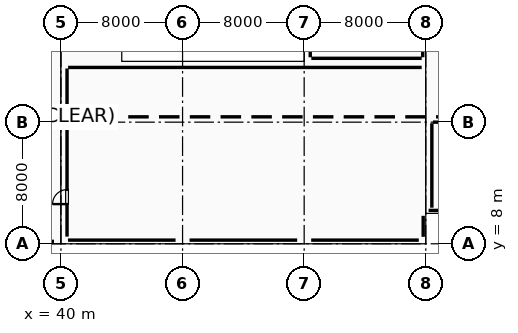
"""IFC4 building model, lengths in metres.
Left out: names, types, materials, properties, quantities, classifications, styles, units other than length and angle.
Written with IfcOpenShell. Run it as: python <this file> out.ifc"""

import sys

from ifc_helpers import new_model, si_unit, direction, frame, frame_2d, origin, origin_2d, place, context, subcontext, project, spatial, rectangle, circle, extrude, element, fill, save


model = new_model("IFC4")
c1 = context("Model", 3, precision=1e-05, world=origin(), true_north=direction((0.0, 1.0)))
c2 = subcontext(c1, "Body", "Model", "MODEL_VIEW")
j1 = project(units=[si_unit("LENGTHUNIT", "METRE"), si_unit("PLANEANGLEUNIT", "RADIAN")], contexts=[c1])
p1 = place(None, origin())
s1 = spatial("IfcSite", under=j1, at=p1, CompositionType="ELEMENT")
p2 = place(p1, origin())
s2 = spatial("IfcBuilding", under=s1, at=p2, CompositionType="ELEMENT")
p3 = place(p2, frame((0.0, 0.0, 10.2)))
s3 = spatial("IfcBuildingStorey", under=s2, at=p3, CompositionType="ELEMENT", Elevation=10.2)
for number, where, z_axis, x_axis in (
    (1, (40.0, 8.0, 0.0), (0.0, 0.0, 1.0), (1.0, 0.0, 0.0)),
    (2, (40.0, 16.0, 0.0), (0.0, 0.0, 1.0), (1.0, 0.0, 0.0)),
):
    element("IfcColumn", number, at=place(p3, frame(where, z_axis=z_axis, x_axis=x_axis)), inside=s3, PredefinedType="COLUMN", context=c2, shape_type="SweptSolid", body=[
        extrude(rectangle(XDim=0.9, YDim=0.9, at=origin_2d()), origin(), (0.0, 0.0, 1.0), 4.8),
    ])
p4 = place(p3, frame((48.0, 8.0, 0.0), z_axis=(0.0, 0.0, 1.0), x_axis=(1.0, 0.0, 0.0)))
e3 = element("IfcColumn", 3, at=p4, inside=s3, PredefinedType="COLUMN", context=c2, shape_type="SweptSolid", body=[
    extrude(circle(Radius=0.45, at=origin_2d()), origin(), (0.0, 0.0, 1.0), 4.76),
])
p5 = place(p3, frame((48.0, 16.0, 0.0), z_axis=(0.0, 0.0, 1.0), x_axis=(1.0, 0.0, 0.0)))
e4 = element("IfcColumn", 4, at=p5, inside=s3, PredefinedType="COLUMN", context=c2, shape_type="SweptSolid", body=[
    extrude(rectangle(XDim=0.75, YDim=0.75, at=origin_2d()), origin(), (0.0, 0.0, 1.0), 4.8),
])
p6 = place(p3, frame((56.0, 8.0, 0.0), z_axis=(0.0, 0.0, 1.0), x_axis=(1.0, 0.0, 0.0)))
e5 = element("IfcColumn", 5, at=p6, inside=s3, PredefinedType="COLUMN", context=c2, shape_type="SweptSolid", body=[
    extrude(circle(Radius=0.45, at=origin_2d()), origin(), (0.0, 0.0, 1.0), 4.76),
])
p7 = place(p3, frame((56.0, 16.0, 0.0), z_axis=(0.0, 0.0, 1.0), x_axis=(1.0, 0.0, 0.0)))
e6 = element("IfcColumn", 6, at=p7, inside=s3, PredefinedType="COLUMN", context=c2, shape_type="SweptSolid", body=[
    extrude(rectangle(XDim=0.75, YDim=0.75, at=origin_2d()), origin(), (0.0, 0.0, 1.0), 4.8),
])
p8 = place(p3, frame((64.0, 8.0, 0.0), z_axis=(0.0, 0.0, 1.0), x_axis=(1.0, 0.0, 0.0)))
e7 = element("IfcColumn", 7, at=p8, inside=s3, PredefinedType="COLUMN", context=c2, shape_type="SweptSolid", body=[
    extrude(rectangle(XDim=0.9, YDim=0.9, at=origin_2d()), origin(), (0.0, 0.0, 1.0), 4.8),
])
p9 = place(p3, frame((118.415, 10.195, 0.0), z_axis=(0.0, 0.0, 1.0), x_axis=(-1.0, 0.0, 0.0)))
e8 = element("IfcWall", 8, at=p9, inside=s3, PredefinedType="STANDARD", context=c2, shape_type="SweptSolid", body=[
    extrude(rectangle(XDim=54.23, YDim=0.35, at=frame_2d((27.115, 0.0))), origin(), (0.0, 0.0, 1.0), 3.725),
])
p10 = place(p3, frame((63.83, 9.84, 0.0), z_axis=(0.0, 0.0, 1.0), x_axis=(0.0, -1.0, 0.0)))
e9 = element("IfcWall", 9, at=p10, inside=s3, PredefinedType="STANDARD", context=c2, shape_type="SweptSolid", body=[
    extrude(rectangle(XDim=1.382, YDim=0.3, at=frame_2d((0.691, 0.0))), origin(), (0.0, 0.0, 1.0), 4.58),
])
for number, where, z_axis, x_axis in (
    (10, (63.54, 8.24, 0.0), (0.0, 0.0, 1.0), (-1.0, 0.0, 0.0)),
    (11, (55.54, 8.24, 0.0), (0.0, 0.0, 1.0), (-1.0, 0.0, 0.0)),
    (12, (47.54, 8.24, 0.0), (0.0, 0.0, 1.0), (-1.0, 0.0, 0.0)),
):
    element("IfcWall", number, at=place(p3, frame(where, z_axis=z_axis, x_axis=x_axis)), inside=s3, PredefinedType="PARAPET", context=c2, shape_type="SweptSolid", body=[
        extrude(rectangle(XDim=7.08, YDim=0.18, at=frame_2d((3.54, 0.0))), origin(), (0.0, 0.0, 1.0), 0.88),
    ])
p11 = place(p3, frame((39.542, 8.16, 0.0), z_axis=(0.0, 0.0, 1.0), x_axis=(-1.0, 0.0, 0.0)))
e13 = element("IfcWall", 13, at=p11, inside=s3, PredefinedType="STANDARD", context=c2, shape_type="SweptSolid", body=[
    extrude(rectangle(XDim=7.184, YDim=0.28, at=frame_2d((3.592, 0.0))), origin(), (0.0, 0.0, 1.0), 4.125),
])
p12 = place(p11, frame((2.392, 0.0, 0.95)))
e14 = element("IfcOpeningElement", 14, at=p12, cuts=e13, PredefinedType="OPENING", context=c2, shape_type="SweptSolid", body=[
    extrude(rectangle(XDim=2.4, YDim=1.2, at=frame_2d((1.2, 0.6))), frame((0.0, 0.15, 0.0), z_axis=(0.0, -1.0, 0.0), x_axis=(1.0, 0.0, 0.0)), (0.0, 0.0, 1.0), 0.3),
])
p13 = place(p3, frame((64.47, 16.0, 0.0), z_axis=(0.0, 0.0, 1.0), x_axis=(1.0, 0.0, 0.0)))
e15 = element("IfcWall", 15, at=p13, inside=s3, PredefinedType="PARTITIONING", context=c2, shape_type="SweptSolid", body=[
    extrude(rectangle(XDim=4.915, YDim=0.1, at=frame_2d((2.458, 0.0))), origin(), (0.0, 0.0, 1.0), 3.92),
])
p14 = place(p13, frame((1.933, 0.0, 0.0)))
e16 = element("IfcOpeningElement", 16, at=p14, cuts=e15, PredefinedType="OPENING", context=c2, shape_type="SweptSolid", body=[
    extrude(rectangle(XDim=1.05, YDim=2.15, at=frame_2d((0.525, 1.075))), frame((0.0, 0.06, 0.0), z_axis=(0.0, -1.0, 0.0), x_axis=(1.0, 0.0, 0.0)), (0.0, 0.0, 1.0), 0.12),
])
p15 = place(p3, frame((64.4, 10.374, 0.0), z_axis=(0.0, 0.0, 1.0), x_axis=(0.0, 1.0, 0.0)))
e17 = element("IfcWall", 17, at=p15, inside=s3, PredefinedType="PARTITIONING", context=c2, shape_type="SweptSolid", body=[
    extrude(rectangle(XDim=5.556, YDim=0.1, at=frame_2d((2.778, 0.0))), origin(), (0.0, 0.0, 1.0), 3.72),
])
p16 = place(p3, frame((40.47, 19.6, 0.0), z_axis=(0.0, 0.0, 1.0), x_axis=(1.0, 0.0, 0.0)))
e18 = element("IfcWall", 18, at=p16, inside=s3, PredefinedType="PARTITIONING", context=c2, shape_type="SweptSolid", body=[
    extrude(rectangle(XDim=23.26, YDim=0.1, at=frame_2d((11.63, 0.0))), origin(), (0.0, 0.0, 1.0), 4.53),
])
p17 = place(p3, frame((40.4, 8.47, 0.0), z_axis=(0.0, 0.0, 1.0), x_axis=(0.0, 1.0, 0.0)))
e19 = element("IfcWall", 19, at=p17, inside=s3, PredefinedType="PARTITIONING", context=c2, shape_type="SweptSolid", body=[
    extrude(rectangle(XDim=7.065, YDim=0.1, at=frame_2d((3.532, 0.0))), origin(), (0.0, 0.0, 1.0), 4.57),
])
p18 = place(p17, frame((2.14, 0.0, 0.0)))
e20 = element("IfcOpeningElement", 20, at=p18, cuts=e19, PredefinedType="OPENING", context=c2, shape_type="SweptSolid", body=[
    extrude(rectangle(XDim=0.95, YDim=2.15, at=frame_2d((0.475, 1.075))), frame((0.0, 0.06, 0.0), z_axis=(0.0, -1.0, 0.0), x_axis=(1.0, 0.0, 0.0)), (0.0, 0.0, 1.0), 0.12),
])
p19 = place(p3, frame((40.4, 16.465, 0.0), z_axis=(0.0, 0.0, 1.0), x_axis=(0.0, 1.0, 0.0)))
e21 = element("IfcWall", 21, at=p19, inside=s3, PredefinedType="PARTITIONING", context=c2, shape_type="SweptSolid", body=[
    extrude(rectangle(XDim=3.065, YDim=0.1, at=frame_2d((1.532, 0.0))), origin(), (0.0, 0.0, 1.0), 4.53),
])
p20 = place(p3, frame((63.8, 40.13, 0.0), z_axis=(0.0, 0.0, 1.0), x_axis=(0.0, -1.0, 0.0)))
e22 = element("IfcWall", 22, at=p20, inside=s3, PredefinedType="PARTITIONING", context=c2, shape_type="SweptSolid", body=[
    extrude(rectangle(XDim=19.86, YDim=0.1, at=frame_2d((9.93, 0.0))), origin(), (0.0, 0.0, 1.0), 3.72),
])
p21 = place(p20, frame((9.455, 0.0, 0.0)))
e23 = element("IfcOpeningElement", 23, at=p21, cuts=e22, PredefinedType="OPENING", context=c2, shape_type="SweptSolid", body=[
    extrude(rectangle(XDim=0.95, YDim=2.15, at=frame_2d((0.475, 1.075))), frame((0.0, 0.06, 0.0), z_axis=(0.0, -1.0, 0.0), x_axis=(1.0, 0.0, 0.0)), (0.0, 0.0, 1.0), 0.12),
])
p22 = place(p3, frame((63.73, 20.2, 0.0), z_axis=(0.0, 0.0, 1.0), x_axis=(-1.0, 0.0, 0.0)))
e24 = element("IfcWall", 24, at=p22, inside=s3, PredefinedType="PARTITIONING", context=c2, shape_type="SweptSolid", body=[
    extrude(rectangle(XDim=7.26, YDim=0.1, at=frame_2d((3.63, 0.0))), origin(), (0.0, 0.0, 1.0), 4.53),
])
p23 = place(p3, frame((56.4, 20.27, 0.0), z_axis=(0.0, 0.0, 1.0), x_axis=(0.0, 1.0, 0.0)))
e25 = element("IfcWall", 25, at=p23, inside=s3, PredefinedType="PARTITIONING", context=c2, shape_type="SweptSolid", body=[
    extrude(rectangle(XDim=3.34, YDim=0.1, at=frame_2d((1.67, 0.0))), origin(), (0.0, 0.0, 1.0), 4.53),
])
p24 = place(p18, origin())
e26 = element("IfcDoor", 26, at=p24, inside=s3, OperationType="SINGLE_SWING_LEFT", PredefinedType="DOOR", context=c2, shape_type="SweptSolid", body=[
    extrude(rectangle(XDim=0.95, YDim=2.15, at=frame_2d((0.475, 1.075))), frame((0.0, 0.025, 0.0), z_axis=(0.0, -1.0, 0.0), x_axis=(1.0, 0.0, 0.0)), (0.0, 0.0, 1.0), 0.05),
])
fill(e20, e26)
save(model, sys.argv[1])
